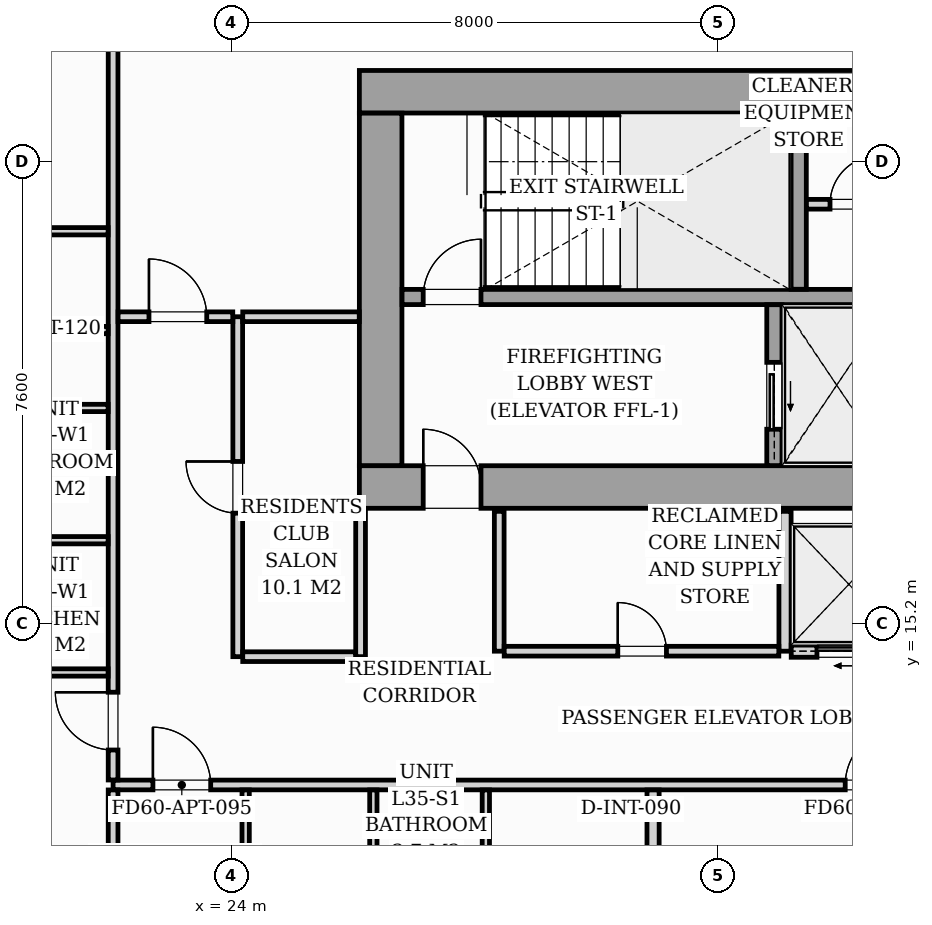
"""IFC4 building model, lengths in metres.
Left out: names, types, materials, properties, quantities, classifications, styles, units other than length and angle.
Written with IfcOpenShell. Run it as: python <this file> out.ifc"""

import sys

from ifc_helpers import new_model, si_unit, direction, frame, frame_2d, origin, origin_2d, place, context, subcontext, project, spatial, rectangle, i_section, extrude, source, transform, mapped, element, fill, save


model = new_model("IFC4")
c1 = context("Model", 3, precision=1e-05, world=origin(), true_north=direction((0.0, 1.0)))
c2 = subcontext(c1, "Body", "Model", "MODEL_VIEW")
j1 = project(units=[si_unit("LENGTHUNIT", "METRE"), si_unit("PLANEANGLEUNIT", "RADIAN")], contexts=[c1])
p1 = place(None, origin())
s1 = spatial("IfcSite", under=j1, at=p1, CompositionType="ELEMENT")
p2 = place(p1, origin())
s2 = spatial("IfcBuilding", under=s1, at=p2, CompositionType="ELEMENT")
p3 = place(p2, frame((0.0, 0.0, 124.6)))
s3 = spatial("IfcBuildingStorey", under=s2, at=p3, CompositionType="ELEMENT", Elevation=124.6)
m1 = source(origin(), c2, "Body", "SweptSolid", [
    extrude(i_section(OverallWidth=0.421, OverallDepth=0.465, WebThickness=0.045, FlangeThickness=0.073, FilletRadius=0.018, at=origin_2d()), origin(), (0.0, 0.0, 1.0), 3.196),
])
for number, where, z_axis, x_axis in (
    (1, (26.4, 17.4, 0.002), (0.0, 0.0, 1.0), (1.0, 0.0, 0.0)),
    (2, (33.12, 17.4, 0.002), (0.0, 0.0, 1.0), (1.0, 0.0, 0.0)),
    (3, (26.4, 24.0, 0.002), (0.0, 0.0, 1.0), (1.0, 0.0, 0.0)),
    (4, (33.12, 24.0, 0.002), (0.0, 0.0, 1.0), (1.0, 0.0, 0.0)),
):
    element("IfcColumn", number, at=place(p3, frame(where, z_axis=z_axis, x_axis=x_axis)), inside=s3, PredefinedType="PILASTER", context=c2, shape_type="MappedRepresentation", body=[
        mapped(m1, transform((0.0, 0.0, 0.0), scale=1.0)),
    ])
p4 = place(p3, frame((26.1, 17.45, 0.0), z_axis=(0.0, 0.0, 1.0), x_axis=(1.0, 0.0, 0.0)))
e5 = element("IfcWall", 5, at=p4, inside=s3, PredefinedType="SHEAR", context=c2, shape_type="SweptSolid", body=[
    extrude(rectangle(XDim=19.8, YDim=0.7, at=frame_2d((9.9, 0.0))), origin(), (0.0, 0.0, 1.0), 3.2),
])
p5 = place(p4, frame((1.05, 0.0, 0.0)))
e6 = element("IfcOpeningElement", 6, at=p5, cuts=e5, PredefinedType="OPENING", context=c2, shape_type="SweptSolid", body=[
    extrude(rectangle(XDim=0.95, YDim=2.06, at=frame_2d((0.475, 1.03))), frame((0.0, 0.36, 0.0), z_axis=(0.0, -1.0, 0.0), x_axis=(1.0, 0.0, 0.0)), (0.0, 0.0, 1.0), 0.72),
])
p6 = place(p4, frame((9.48, 0.0, 0.0)))
e7 = element("IfcOpeningElement", 7, at=p6, cuts=e5, PredefinedType="OPENING", context=c2, shape_type="SweptSolid", body=[
    extrude(rectangle(XDim=0.85, YDim=2.0, at=frame_2d((0.425, 1.0))), frame((0.0, 0.36, 0.0), z_axis=(0.0, -1.0, 0.0), x_axis=(1.0, 0.0, 0.0)), (0.0, 0.0, 1.0), 0.72),
])
p7 = place(p4, frame((17.65, 0.0, 0.0)))
e8 = element("IfcOpeningElement", 8, at=p7, cuts=e5, PredefinedType="OPENING", context=c2, shape_type="SweptSolid", body=[
    extrude(rectangle(XDim=0.95, YDim=2.06, at=frame_2d((0.475, 1.03))), frame((0.0, 0.36, 0.0), z_axis=(0.0, -1.0, 0.0), x_axis=(1.0, 0.0, 0.0)), (0.0, 0.0, 1.0), 0.72),
])
p8 = place(p3, frame((26.1, 23.95, 0.0), z_axis=(0.0, 0.0, 1.0), x_axis=(1.0, 0.0, 0.0)))
e9 = element("IfcWall", 9, at=p8, inside=s3, PredefinedType="SHEAR", context=c2, shape_type="SweptSolid", body=[
    extrude(rectangle(XDim=19.8, YDim=0.7, at=frame_2d((9.9, 0.0))), origin(), (0.0, 0.0, 1.0), 3.2),
])
p9 = place(p3, frame((26.45, 17.802, 0.0), z_axis=(0.0, 0.0, 1.0), x_axis=(0.0, 1.0, 0.0)))
e10 = element("IfcWall", 10, at=p9, inside=s3, PredefinedType="SHEAR", context=c2, shape_type="SweptSolid", body=[
    extrude(rectangle(XDim=5.796, YDim=0.7, at=frame_2d((2.898, 0.0))), origin(), (0.0, 0.0, 1.0), 3.2),
])
p10 = place(p3, frame((26.802, 20.575, 0.0), z_axis=(0.0, 0.0, 1.0), x_axis=(1.0, 0.0, 0.0)))
e11 = element("IfcWall", 11, at=p10, inside=s3, PredefinedType="SOLIDWALL", context=c2, shape_type="SweptSolid", body=[
    extrude(rectangle(XDim=8.148, YDim=0.25, at=frame_2d((4.074, 0.0))), origin(), (0.0, 0.0, 1.0), 3.2),
])
p11 = place(p10, frame((0.348, 0.0, 0.0)))
e12 = element("IfcOpeningElement", 12, at=p11, cuts=e11, PredefinedType="OPENING", context=c2, shape_type="SweptSolid", body=[
    extrude(rectangle(XDim=0.95, YDim=2.06, at=frame_2d((0.475, 1.03))), frame((0.0, 0.135, 0.0), z_axis=(0.0, -1.0, 0.0), x_axis=(1.0, 0.0, 0.0)), (0.0, 0.0, 1.0), 0.27),
])
p12 = place(p3, frame((33.325, 20.702, 0.0), z_axis=(0.0, 0.0, 1.0), x_axis=(0.0, 1.0, 0.0)))
e13 = element("IfcWall", 13, at=p12, inside=s3, PredefinedType="SOLIDWALL", context=c2, shape_type="SweptSolid", body=[
    extrude(rectangle(XDim=2.896, YDim=0.25, at=frame_2d((1.448, 0.0))), origin(), (0.0, 0.0, 1.0), 3.2),
])
p13 = place(p3, frame((32.925, 17.802, 0.0), z_axis=(0.0, 0.0, 1.0), x_axis=(0.0, 1.0, 0.0)))
e14 = element("IfcWall", 14, at=p13, inside=s3, PredefinedType="SOLIDWALL", context=c2, shape_type="SweptSolid", body=[
    extrude(rectangle(XDim=2.646, YDim=0.25, at=frame_2d((1.323, 0.0))), origin(), (0.0, 0.0, 1.0), 3.2),
])
p14 = place(p13, frame((0.598, 0.0, 0.0)))
e15 = element("IfcOpeningElement", 15, at=p14, cuts=e14, PredefinedType="OPENING", context=c2, shape_type="SweptSolid", body=[
    extrude(rectangle(XDim=1.1, YDim=2.08, at=frame_2d((0.55, 1.04))), frame((0.0, 0.135, 0.0), z_axis=(0.0, -1.0, 0.0), x_axis=(1.0, 0.0, 0.0)), (0.0, 0.0, 1.0), 0.27),
])
p15 = place(p3, frame((33.452, 22.1, 0.0), z_axis=(0.0, 0.0, 1.0), x_axis=(1.0, 0.0, 0.0)))
e16 = element("IfcWall", 16, at=p15, inside=s3, PredefinedType="PARTITIONING", context=c2, shape_type="SweptSolid", body=[
    extrude(rectangle(XDim=5.096, YDim=0.16, at=frame_2d((2.548, 0.0))), origin(), (0.0, 0.0, 1.0), 2.94),
])
p16 = place(p15, frame((0.388, 0.0, 0.0)))
e17 = element("IfcOpeningElement", 17, at=p16, cuts=e16, PredefinedType="OPENING", context=c2, shape_type="SweptSolid", body=[
    extrude(rectangle(XDim=0.8, YDim=2.05, at=frame_2d((0.4, 1.025))), frame((0.0, 0.09, 0.0), z_axis=(0.0, -1.0, 0.0), x_axis=(1.0, 0.0, 0.0)), (0.0, 0.0, 1.0), 0.18),
])
p17 = place(p15, frame((2.148, 0.0, 0.0)))
e18 = element("IfcOpeningElement", 18, at=p17, cuts=e16, PredefinedType="OPENING", context=c2, shape_type="SweptSolid", body=[
    extrude(rectangle(XDim=0.8, YDim=2.05, at=frame_2d((0.4, 1.025))), frame((0.0, 0.09, 0.0), z_axis=(0.0, -1.0, 0.0), x_axis=(1.0, 0.0, 0.0)), (0.0, 0.0, 1.0), 0.18),
])
p18 = place(p15, frame((3.908, 0.0, 0.0)))
e19 = element("IfcOpeningElement", 19, at=p18, cuts=e16, PredefinedType="OPENING", context=c2, shape_type="SweptSolid", body=[
    extrude(rectangle(XDim=0.8, YDim=2.05, at=frame_2d((0.4, 1.025))), frame((0.0, 0.09, 0.0), z_axis=(0.0, -1.0, 0.0), x_axis=(1.0, 0.0, 0.0)), (0.0, 0.0, 1.0), 0.18),
])
p19 = place(p3, frame((28.4, 14.75, 0.0), z_axis=(0.0, 0.0, 1.0), x_axis=(0.0, 1.0, 0.0)))
e20 = element("IfcWall", 20, at=p19, inside=s3, PredefinedType="PARTITIONING", context=c2, shape_type="SweptSolid", body=[
    extrude(rectangle(XDim=2.3, YDim=0.16, at=frame_2d((1.15, 0.0))), origin(), (0.0, 0.0, 1.0), 2.94),
])
p20 = place(p3, frame((33.1, 14.75, 0.0), z_axis=(0.0, 0.0, 1.0), x_axis=(0.0, 1.0, 0.0)))
e21 = element("IfcWall", 21, at=p20, inside=s3, PredefinedType="PARTITIONING", context=c2, shape_type="SweptSolid", body=[
    extrude(rectangle(XDim=2.3, YDim=0.2, at=frame_2d((1.15, 0.0))), origin(), (0.0, 0.0, 1.0), 2.94),
])
p21 = place(p3, frame((28.482, 14.75, 0.0), z_axis=(0.0, 0.0, 1.0), x_axis=(1.0, 0.0, 0.0)))
e22 = element("IfcWall", 22, at=p21, inside=s3, PredefinedType="PARTITIONING", context=c2, shape_type="SweptSolid", body=[
    extrude(rectangle(XDim=4.516, YDim=0.16, at=frame_2d((2.258, 0.0))), origin(), (0.0, 0.0, 1.0), 2.94),
])
p22 = place(p21, frame((1.868, 0.0, 0.0)))
e23 = element("IfcOpeningElement", 23, at=p22, cuts=e22, PredefinedType="OPENING", context=c2, shape_type="SweptSolid", body=[
    extrude(rectangle(XDim=0.8, YDim=2.05, at=frame_2d((0.4, 1.025))), frame((0.0, 0.09, 0.0), z_axis=(0.0, -1.0, 0.0), x_axis=(1.0, 0.0, 0.0)), (0.0, 0.0, 1.0), 0.18),
])
p23 = place(p3, frame((33.202, 14.75, 0.0), z_axis=(0.0, 0.0, 1.0), x_axis=(1.0, 0.0, 0.0)))
e24 = element("IfcWall", 24, at=p23, inside=s3, PredefinedType="PARTITIONING", context=c2, shape_type="SweptSolid", body=[
    extrude(rectangle(XDim=1.896, YDim=0.2, at=frame_2d((0.948, 0.0))), origin(), (0.0, 0.0, 1.0), 2.94),
])
p24 = place(p23, frame((0.423, 0.0, 0.0)))
e25 = element("IfcOpeningElement", 25, at=p24, cuts=e24, PredefinedType="OPENING", context=c2, shape_type="SweptSolid", body=[
    extrude(rectangle(XDim=1.05, YDim=2.08, at=frame_2d((0.525, 1.04))), frame((0.0, 0.11, 0.0), z_axis=(0.0, -1.0, 0.0), x_axis=(1.0, 0.0, 0.0)), (0.0, 0.0, 1.0), 0.22),
])
p25 = place(p3, frame((22.05, 12.55, 0.0), z_axis=(0.0, 0.0, 1.0), x_axis=(1.0, 0.0, 0.0)))
e26 = element("IfcWall", 26, at=p25, inside=s3, PredefinedType="PARTITIONING", context=c2, shape_type="SweptSolid", body=[
    extrude(rectangle(XDim=23.83, YDim=0.16, at=frame_2d((11.915, 0.0))), origin(), (0.0, 0.0, 1.0), 2.94),
])
p26 = place(p25, frame((0.655, 0.0, 0.0)))
e27 = element("IfcOpeningElement", 27, at=p26, cuts=e26, PredefinedType="OPENING", context=c2, shape_type="SweptSolid", body=[
    extrude(rectangle(XDim=0.95, YDim=2.06, at=frame_2d((0.475, 1.03))), frame((0.0, 0.09, 0.0), z_axis=(0.0, -1.0, 0.0), x_axis=(1.0, 0.0, 0.0)), (0.0, 0.0, 1.0), 0.18),
])
p27 = place(p25, frame((12.04, 0.0, 0.0)))
e28 = element("IfcOpeningElement", 28, at=p27, cuts=e26, PredefinedType="OPENING", context=c2, shape_type="SweptSolid", body=[
    extrude(rectangle(XDim=0.95, YDim=2.06, at=frame_2d((0.475, 1.03))), frame((0.0, 0.09, 0.0), z_axis=(0.0, -1.0, 0.0), x_axis=(1.0, 0.0, 0.0)), (0.0, 0.0, 1.0), 0.18),
])
p28 = place(p3, frame((22.05, 8.253, 0.0), z_axis=(0.0, 0.0, 1.0), x_axis=(0.0, 1.0, 0.0)))
e29 = element("IfcWall", 29, at=p28, inside=s3, PredefinedType="PARTITIONING", context=c2, shape_type="SweptSolid", body=[
    extrude(rectangle(XDim=4.215, YDim=0.16, at=frame_2d((2.107, 0.0))), origin(), (0.0, 0.0, 1.0), 2.94),
])
p29 = place(p3, frame((22.05, 12.632, 0.0), z_axis=(0.0, 0.0, 1.0), x_axis=(0.0, 1.0, 0.0)))
e30 = element("IfcWall", 30, at=p29, inside=s3, PredefinedType="PARTITIONING", context=c2, shape_type="SweptSolid", body=[
    extrude(rectangle(XDim=14.785, YDim=0.16, at=frame_2d((7.393, 0.0))), origin(), (0.0, 0.0, 1.0), 2.94),
])
p30 = place(p29, frame((0.493, 0.0, 0.0)))
e31 = element("IfcOpeningElement", 31, at=p30, cuts=e30, PredefinedType="OPENING", context=c2, shape_type="SweptSolid", body=[
    extrude(rectangle(XDim=0.95, YDim=2.06, at=frame_2d((0.475, 1.03))), frame((0.0, 0.09, 0.0), z_axis=(0.0, -1.0, 0.0), x_axis=(1.0, 0.0, 0.0)), (0.0, 0.0, 1.0), 0.18),
])
p31 = place(p3, frame((28.18, 7.48, 0.0), z_axis=(0.0, 0.0, 1.0), x_axis=(0.0, 1.0, 0.0)))
e32 = element("IfcWall", 32, at=p31, inside=s3, PredefinedType="PARTITIONING", context=c2, shape_type="SweptSolid", body=[
    extrude(rectangle(XDim=4.988, YDim=0.12, at=frame_2d((2.494, 0.0))), origin(), (0.0, 0.0, 1.0), 2.94),
])
p32 = place(p31, frame((1.835, 0.0, 0.0)))
e33 = element("IfcOpeningElement", 33, at=p32, cuts=e32, PredefinedType="OPENING", context=c2, shape_type="SweptSolid", body=[
    extrude(rectangle(XDim=0.9, YDim=2.05, at=frame_2d((0.45, 1.025))), frame((0.0, 0.07, 0.0), z_axis=(0.0, -1.0, 0.0), x_axis=(1.0, 0.0, 0.0)), (0.0, 0.0, 1.0), 0.14),
])
for number, where, z_axis, x_axis in (
    (34, (26.33, 10.362, 0.0), (0.0, 0.0, 1.0), (0.0, 1.0, 0.0)),
    (35, (24.23, 10.362, 0.0), (0.0, 0.0, 1.0), (0.0, 1.0, 0.0)),
):
    element("IfcWall", number, at=place(p3, frame(where, z_axis=z_axis, x_axis=x_axis)), inside=s3, PredefinedType="PARTITIONING", context=c2, shape_type="SweptSolid", body=[
        extrude(rectangle(XDim=2.106, YDim=0.12, at=frame_2d((1.053, 0.0))), origin(), (0.0, 0.0, 1.0), 2.94),
    ])
p33 = place(p3, frame((30.93, 10.401, 0.0), z_axis=(0.0, 0.0, 1.0), x_axis=(0.0, 1.0, 0.0)))
e36 = element("IfcWall", 36, at=p33, inside=s3, PredefinedType="PARTITIONING", context=c2, shape_type="SweptSolid", body=[
    extrude(rectangle(XDim=2.067, YDim=0.2, at=frame_2d((1.034, 0.0))), origin(), (0.0, 0.0, 1.0), 2.94),
])
for number, where, z_axis, x_axis in (
    (37, (19.712, 16.575, 0.0), (0.0, 0.0, 1.0), (1.0, 0.0, 0.0)),
    (38, (19.712, 14.4, 0.0), (0.0, 0.0, 1.0), (1.0, 0.0, 0.0)),
    (39, (19.712, 18.75, 0.0), (0.0, 0.0, 1.0), (1.0, 0.0, 0.0)),
):
    element("IfcWall", number, at=place(p3, frame(where, z_axis=z_axis, x_axis=x_axis)), inside=s3, PredefinedType="PARTITIONING", context=c2, shape_type="SweptSolid", body=[
        extrude(rectangle(XDim=2.256, YDim=0.12, at=frame_2d((1.128, 0.0))), origin(), (0.0, 0.0, 1.0), 2.94),
    ])
p34 = place(p3, frame((6.424, 21.656, 0.0), z_axis=(0.0, 0.0, 1.0), x_axis=(1.0, 0.0, 0.0)))
e40 = element("IfcWall", 40, at=p34, inside=s3, PredefinedType="PARTITIONING", context=c2, shape_type="SweptSolid", body=[
    extrude(rectangle(XDim=15.544, YDim=0.12, at=frame_2d((7.772, 0.0))), origin(), (0.0, 0.0, 1.0), 2.94),
])
p35 = place(p34, frame((9.422, 0.0, 0.0)))
e41 = element("IfcOpeningElement", 41, at=p35, cuts=e40, PredefinedType="OPENING", context=c2, shape_type="SweptSolid", body=[
    extrude(rectangle(XDim=0.85, YDim=2.05, at=frame_2d((0.425, 1.025))), frame((0.0, 0.07, 0.0), z_axis=(0.0, -1.0, 0.0), x_axis=(1.0, 0.0, 0.0)), (0.0, 0.0, 1.0), 0.14),
])
p36 = place(p3, frame((6.268, 20.031, 0.0), z_axis=(0.0, 0.0, 1.0), x_axis=(1.0, 0.0, 0.0)))
e42 = element("IfcWall", 42, at=p36, inside=s3, PredefinedType="PARTITIONING", context=c2, shape_type="SweptSolid", body=[
    extrude(rectangle(XDim=15.7, YDim=0.12, at=frame_2d((7.85, 0.0))), origin(), (0.0, 0.0, 1.0), 2.94),
])
p37 = place(p36, frame((9.579, 0.0, 0.0)))
e43 = element("IfcOpeningElement", 43, at=p37, cuts=e42, PredefinedType="OPENING", context=c2, shape_type="SweptSolid", body=[
    extrude(rectangle(XDim=0.85, YDim=2.05, at=frame_2d((0.425, 1.025))), frame((0.0, 0.07, 0.0), z_axis=(0.0, -1.0, 0.0), x_axis=(1.0, 0.0, 0.0)), (0.0, 0.0, 1.0), 0.14),
])
p38 = place(p3, frame((24.1, 14.66, 0.0), z_axis=(0.0, 0.0, 1.0), x_axis=(0.0, 1.0, 0.0)))
e44 = element("IfcWall", 44, at=p38, inside=s3, PredefinedType="PARTITIONING", context=c2, shape_type="SweptSolid", body=[
    extrude(rectangle(XDim=5.59, YDim=0.16, at=frame_2d((2.795, 0.0))), origin(), (0.0, 0.0, 1.0), 2.94),
])
p39 = place(p38, frame((2.36, 0.0, 0.0)))
e45 = element("IfcOpeningElement", 45, at=p39, cuts=e44, PredefinedType="OPENING", context=c2, shape_type="SweptSolid", body=[
    extrude(rectangle(XDim=0.85, YDim=2.0, at=frame_2d((0.425, 1.0))), frame((0.0, 0.09, 0.0), z_axis=(0.0, -1.0, 0.0), x_axis=(1.0, 0.0, 0.0)), (0.0, 0.0, 1.0), 0.18),
])
p40 = place(p3, frame((22.132, 20.25, 0.0), z_axis=(0.0, 0.0, 1.0), x_axis=(1.0, 0.0, 0.0)))
e46 = element("IfcWall", 46, at=p40, inside=s3, PredefinedType="PARTITIONING", context=c2, shape_type="SweptSolid", body=[
    extrude(rectangle(XDim=1.886, YDim=0.16, at=frame_2d((0.943, 0.0))), origin(), (0.0, 0.0, 1.0), 2.94),
])
p41 = place(p40, frame((0.508, 0.0, 0.0)))
e47 = element("IfcOpeningElement", 47, at=p41, cuts=e46, PredefinedType="OPENING", context=c2, shape_type="SweptSolid", body=[
    extrude(rectangle(XDim=0.95, YDim=2.06, at=frame_2d((0.475, 1.03))), frame((0.0, 0.09, 0.0), z_axis=(0.0, -1.0, 0.0), x_axis=(1.0, 0.0, 0.0)), (0.0, 0.0, 1.0), 0.18),
])
p42 = place(p3, frame((24.182, 20.25, 0.0), z_axis=(0.0, 0.0, 1.0), x_axis=(1.0, 0.0, 0.0)))
e48 = element("IfcWall", 48, at=p42, inside=s3, PredefinedType="PARTITIONING", context=c2, shape_type="SweptSolid", body=[
    extrude(rectangle(XDim=1.916, YDim=0.16, at=frame_2d((0.958, 0.0))), origin(), (0.0, 0.0, 1.0), 2.94),
])
p43 = place(p3, frame((26.12, 14.66, 0.0), z_axis=(0.0, 0.0, 1.0), x_axis=(0.0, 1.0, 0.0)))
e49 = element("IfcWall", 49, at=p43, inside=s3, PredefinedType="PARTITIONING", context=c2, shape_type="SweptSolid", body=[
    extrude(rectangle(XDim=2.438, YDim=0.16, at=frame_2d((1.219, 0.0))), origin(), (0.0, 0.0, 1.0), 2.94),
])
p44 = place(p3, frame((24.182, 14.66, 0.0), z_axis=(0.0, 0.0, 1.0), x_axis=(1.0, 0.0, 0.0)))
e50 = element("IfcWall", 50, at=p44, inside=s3, PredefinedType="PARTITIONING", context=c2, shape_type="SweptSolid", body=[
    extrude(rectangle(XDim=1.856, YDim=0.16, at=frame_2d((0.928, 0.0))), origin(), (0.0, 0.0, 1.0), 2.94),
])
m2 = source(origin(), c2, "Body", "SweptSolid", [
    extrude(rectangle(XDim=0.95, YDim=2.06, at=frame_2d((0.475, 1.03))), frame((0.0, 0.025, 0.0), z_axis=(0.0, -1.0, 0.0), x_axis=(1.0, 0.0, 0.0)), (0.0, 0.0, 1.0), 0.05),
])
p45 = place(p5, origin())
e51 = element("IfcDoor", 51, at=p45, inside=s3, OperationType="SINGLE_SWING_LEFT", PredefinedType="DOOR", context=c2, shape_type="MappedRepresentation", body=[
    mapped(m2, transform((0.0, 0.0, 0.0), scale=1.0)),
])
fill(e6, e51)
p46 = place(p11, origin())
e52 = element("IfcDoor", 52, at=p46, inside=s3, OperationType="SINGLE_SWING_RIGHT", PredefinedType="DOOR", context=c2, shape_type="MappedRepresentation", body=[
    mapped(m2, transform((0.0, 0.0, 0.0), scale=1.0)),
])
fill(e12, e52)
m3 = source(origin(), c2, "Body", "SweptSolid", [
    extrude(rectangle(XDim=1.1, YDim=2.08, at=frame_2d((0.55, 1.04))), frame((0.0, 0.025, 0.0), z_axis=(0.0, -1.0, 0.0), x_axis=(1.0, 0.0, 0.0)), (0.0, 0.0, 1.0), 0.05),
])
p47 = place(p14, origin())
e53 = element("IfcDoor", 53, at=p47, inside=s3, OperationType="SLIDING_TO_LEFT", PredefinedType="DOOR", context=c2, shape_type="MappedRepresentation", body=[
    mapped(m3, transform((0.0, 0.0, 0.0), scale=1.0)),
])
fill(e15, e53)
m4 = source(origin(), c2, "Body", "SweptSolid", [
    extrude(rectangle(XDim=0.8, YDim=2.05, at=frame_2d((0.4, 1.025))), frame((0.0, 0.025, 0.0), z_axis=(0.0, -1.0, 0.0), x_axis=(1.0, 0.0, 0.0)), (0.0, 0.0, 1.0), 0.05),
])
p48 = place(p16, origin())
e54 = element("IfcDoor", 54, at=p48, inside=s3, OperationType="SINGLE_SWING_RIGHT", PredefinedType="DOOR", context=c2, shape_type="MappedRepresentation", body=[
    mapped(m4, transform((0.0, 0.0, 0.0), scale=1.0)),
])
fill(e17, e54)
p49 = place(p22, origin())
e55 = element("IfcDoor", 55, at=p49, inside=s3, OperationType="SINGLE_SWING_LEFT", PredefinedType="DOOR", context=c2, shape_type="MappedRepresentation", body=[
    mapped(m4, transform((0.0, 0.0, 0.0), scale=1.0)),
])
fill(e23, e55)
m5 = source(origin(), c2, "Body", "SweptSolid", [
    extrude(rectangle(XDim=1.05, YDim=2.08, at=frame_2d((0.525, 1.04))), frame((0.0, 0.025, 0.0), z_axis=(0.0, -1.0, 0.0), x_axis=(1.0, 0.0, 0.0)), (0.0, 0.0, 1.0), 0.05),
])
p50 = place(p24, origin())
e56 = element("IfcDoor", 56, at=p50, inside=s3, OperationType="SLIDING_TO_LEFT", PredefinedType="DOOR", context=c2, shape_type="MappedRepresentation", body=[
    mapped(m5, transform((0.0, 0.0, 0.0), scale=1.0)),
])
fill(e25, e56)
m6 = source(origin(), c2, "Body", "SweptSolid", [
    extrude(rectangle(XDim=0.95, YDim=2.06, at=frame_2d((0.475, 1.03))), frame((0.0, 0.025, 0.0), z_axis=(0.0, -1.0, 0.0), x_axis=(1.0, 0.0, 0.0)), (0.0, 0.0, 1.0), 0.05),
])
p51 = place(p26, origin())
e57 = element("IfcDoor", 57, at=p51, inside=s3, OperationType="SINGLE_SWING_LEFT", PredefinedType="DOOR", context=c2, shape_type="MappedRepresentation", body=[
    mapped(m6, transform((0.0, 0.0, 0.0), scale=1.0)),
])
fill(e27, e57)
p52 = place(p27, origin())
e58 = element("IfcDoor", 58, at=p52, inside=s3, OperationType="SINGLE_SWING_RIGHT", PredefinedType="DOOR", context=c2, shape_type="MappedRepresentation", body=[
    mapped(m6, transform((0.0, 0.0, 0.0), scale=1.0)),
])
fill(e28, e58)
p53 = place(p30, origin())
e59 = element("IfcDoor", 59, at=p53, inside=s3, OperationType="SINGLE_SWING_RIGHT", PredefinedType="DOOR", context=c2, shape_type="MappedRepresentation", body=[
    mapped(m6, transform((0.0, 0.0, 0.0), scale=1.0)),
])
fill(e31, e59)
m7 = source(origin(), c2, "Body", "SweptSolid", [
    extrude(rectangle(XDim=0.85, YDim=2.0, at=frame_2d((0.425, 1.0))), frame((0.0, 0.025, 0.0), z_axis=(0.0, -1.0, 0.0), x_axis=(1.0, 0.0, 0.0)), (0.0, 0.0, 1.0), 0.05),
])
p54 = place(p39, origin())
e60 = element("IfcDoor", 60, at=p54, inside=s3, OperationType="SINGLE_SWING_RIGHT", PredefinedType="DOOR", context=c2, shape_type="MappedRepresentation", body=[
    mapped(m7, transform((0.0, 0.0, 0.0), scale=1.0)),
])
fill(e45, e60)
p55 = place(p41, origin())
e61 = element("IfcDoor", 61, at=p55, inside=s3, OperationType="SINGLE_SWING_LEFT", PredefinedType="DOOR", context=c2, shape_type="MappedRepresentation", body=[
    mapped(m6, transform((0.0, 0.0, 0.0), scale=1.0)),
])
fill(e47, e61)
save(model, sys.argv[1])
